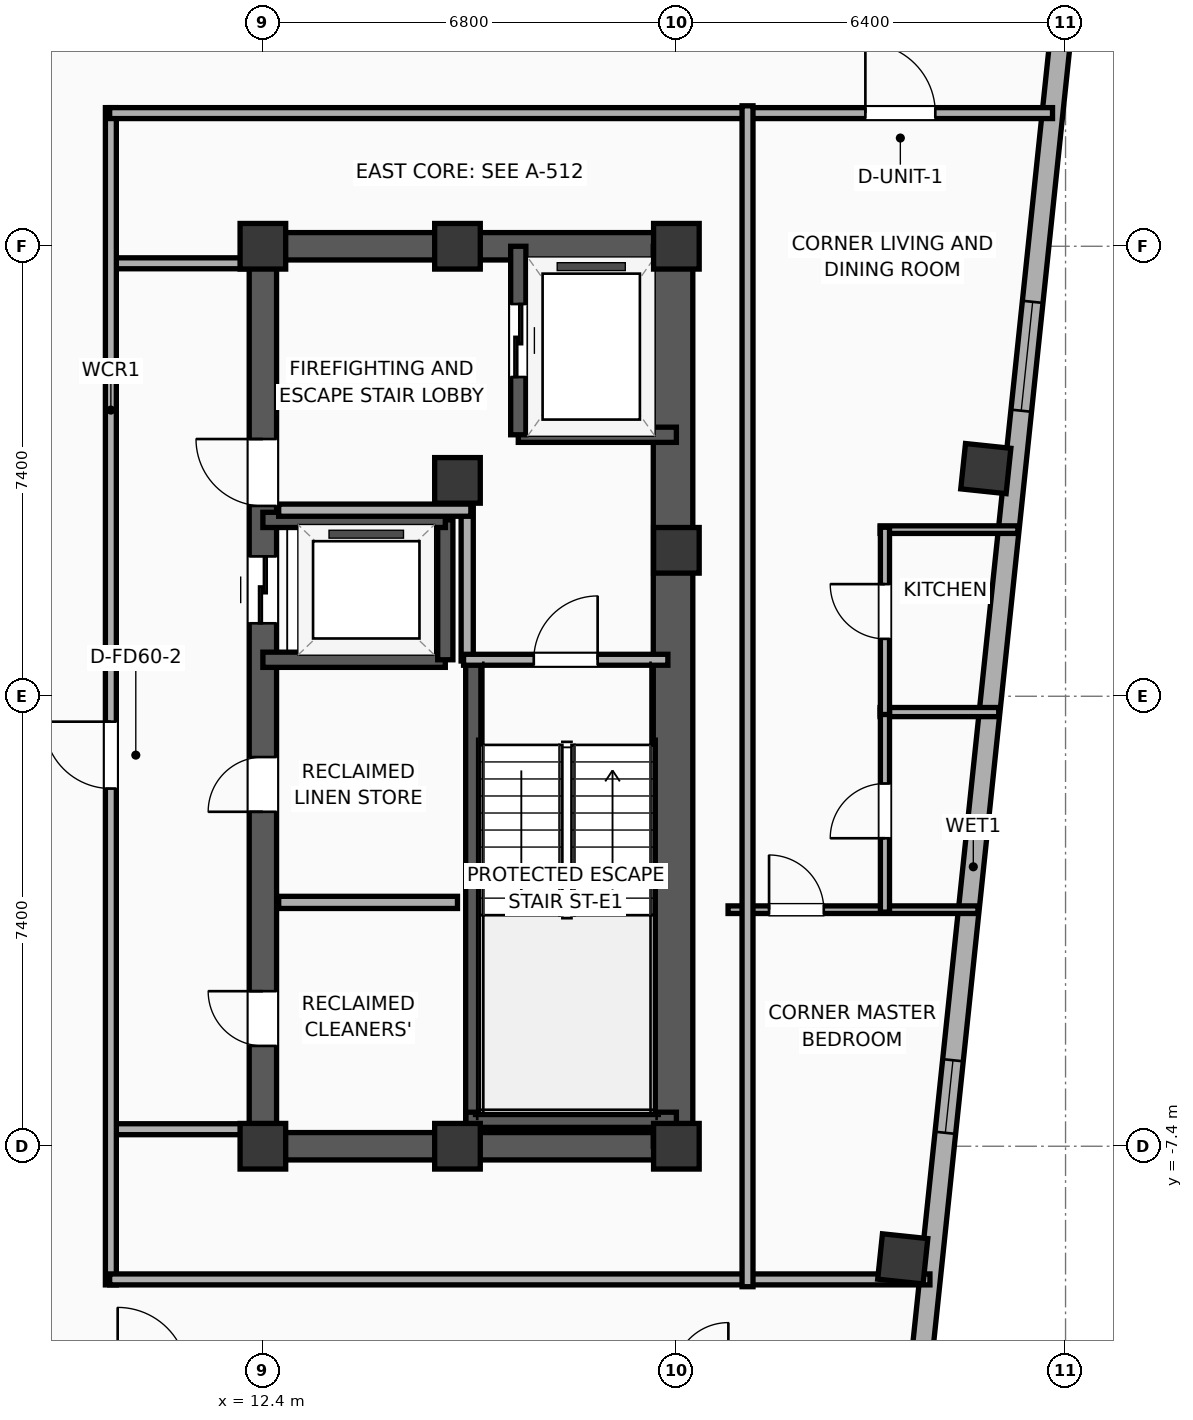
"""IFC4 building model, lengths in metres.
Left out: names, types, materials, properties, quantities, classifications, styles, units other than length and angle.
Written with IfcOpenShell. Run it as: python <this file> out.ifc"""

import sys

from ifc_helpers import new_model, si_unit, direction, frame, frame_2d, origin, origin_2d, place, context, subcontext, project, spatial, rectangle, hollow_rectangle, extrude, element, fill, save


model = new_model("IFC4")
c1 = context("Model", 3, precision=1e-05, world=origin(), true_north=direction((0.0, 1.0)))
c2 = subcontext(c1, "Body", "Model", "MODEL_VIEW")
j1 = project(units=[si_unit("LENGTHUNIT", "METRE"), si_unit("PLANEANGLEUNIT", "RADIAN")], contexts=[c1])
p1 = place(None, origin())
s1 = spatial("IfcSite", under=j1, at=p1, CompositionType="ELEMENT")
p2 = place(p1, origin())
s2 = spatial("IfcBuilding", under=s1, at=p2, CompositionType="ELEMENT")
p3 = place(p2, frame((0.0, 0.0, 287.3)))
s3 = spatial("IfcBuildingStorey", under=s2, at=p3, CompositionType="ELEMENT", Elevation=287.3)
for number, where, z_axis, x_axis in (
    (1, (12.4, -7.4, 0.0), (0.0, 0.0, 1.0), (1.0, 0.0, 0.0)),
    (2, (15.6, 3.55, 0.0), (0.0, 0.0, 1.0), (1.0, 0.0, 0.0)),
    (3, (12.4, 7.4, 0.0), (0.0, 0.0, 1.0), (1.0, 0.0, 0.0)),
    (4, (15.6, -7.4, 0.0), (0.0, 0.0, 1.0), (1.0, 0.0, 0.0)),
    (5, (15.6, 7.4, 0.0), (0.0, 0.0, 1.0), (1.0, 0.0, 0.0)),
    (6, (19.2, -7.4, 0.0), (0.0, 0.0, 1.0), (1.0, 0.0, 0.0)),
    (7, (19.2, 2.4, 0.0), (0.0, 0.0, 1.0), (1.0, 0.0, 0.0)),
    (8, (19.2, 7.4, 0.0), (0.0, 0.0, 1.0), (1.0, 0.0, 0.0)),
):
    element("IfcColumn", number, at=place(p3, frame(where, z_axis=z_axis, x_axis=x_axis)), inside=s3, PredefinedType="COLUMN", context=c2, shape_type="SweptSolid", body=[
        extrude(rectangle(XDim=0.75, YDim=0.75, at=origin_2d()), origin(), (0.0, 0.0, 1.0), 3.9),
    ])
for number, where, z_axis, x_axis in (
    (9, (12.175, -7.4, 0.0), (0.0, 0.0, 1.0), (1.0, 0.0, 0.0)),
    (10, (12.175, 7.4, 0.0), (0.0, 0.0, 1.0), (1.0, 0.0, 0.0)),
):
    element("IfcWall", number, at=place(p3, frame(where, z_axis=z_axis, x_axis=x_axis)), inside=s3, PredefinedType="SHEAR", context=c2, shape_type="SweptSolid", body=[
        extrude(rectangle(XDim=7.25, YDim=0.45, at=frame_2d((3.625, 0.0))), origin(), (0.0, 0.0, 1.0), 3.635),
    ])
p4 = place(p3, frame((12.4, -7.4, 0.0), z_axis=(0.0, 0.0, 1.0), x_axis=(0.0, 1.0, 0.0)))
e11 = element("IfcWall", 11, at=p4, inside=s3, PredefinedType="SHEAR", context=c2, shape_type="SweptSolid", body=[
    extrude(rectangle(XDim=14.8, YDim=0.45, at=frame_2d((7.4, 0.0))), origin(), (0.0, 0.0, 1.0), 3.635),
])
p5 = place(p4, frame((8.6, 0.0, 0.0)))
e12 = element("IfcOpeningElement", 12, at=p5, cuts=e11, PredefinedType="OPENING", context=c2, shape_type="SweptSolid", body=[
    extrude(rectangle(XDim=1.1, YDim=2.05, at=frame_2d((0.55, 1.025))), frame((0.0, 0.235, 0.0), z_axis=(0.0, -1.0, 0.0), x_axis=(1.0, 0.0, 0.0)), (0.0, 0.0, 1.0), 0.47),
])
p6 = place(p4, frame((10.53, 0.0, 0.0)))
e13 = element("IfcOpeningElement", 13, at=p6, cuts=e11, PredefinedType="OPENING", context=c2, shape_type="SweptSolid", body=[
    extrude(rectangle(XDim=1.1, YDim=2.05, at=frame_2d((0.55, 1.025))), frame((0.0, 0.235, 0.0), z_axis=(0.0, -1.0, 0.0), x_axis=(1.0, 0.0, 0.0)), (0.0, 0.0, 1.0), 0.47),
])
p7 = place(p4, frame((1.65, 0.0, 0.0)))
e14 = element("IfcOpeningElement", 14, at=p7, cuts=e11, PredefinedType="OPENING", context=c2, shape_type="SweptSolid", body=[
    extrude(rectangle(XDim=0.9, YDim=2.05, at=frame_2d((0.45, 1.025))), frame((0.0, 0.235, 0.0), z_axis=(0.0, -1.0, 0.0), x_axis=(1.0, 0.0, 0.0)), (0.0, 0.0, 1.0), 0.47),
])
p8 = place(p4, frame((5.5, 0.0, 0.0)))
e15 = element("IfcOpeningElement", 15, at=p8, cuts=e11, PredefinedType="OPENING", context=c2, shape_type="SweptSolid", body=[
    extrude(rectangle(XDim=0.9, YDim=2.05, at=frame_2d((0.45, 1.025))), frame((0.0, 0.235, 0.0), z_axis=(0.0, -1.0, 0.0), x_axis=(1.0, 0.0, 0.0)), (0.0, 0.0, 1.0), 0.47),
])
p9 = place(p3, frame((19.145, -7.4, 0.0), z_axis=(0.0, 0.0, 1.0), x_axis=(0.0, 1.0, 0.0)))
e16 = element("IfcWall", 16, at=p9, inside=s3, PredefinedType="SHEAR", context=c2, shape_type="SweptSolid", body=[
    extrude(rectangle(XDim=14.8, YDim=0.65, at=frame_2d((7.4, 0.0))), origin(), (0.0, 0.0, 1.0), 3.635),
])
p10 = place(p3, frame((15.86, -7.085, 0.0), z_axis=(0.0, 0.0, 1.0), x_axis=(0.0, 1.0, 0.0)))
e17 = element("IfcWall", 17, at=p10, inside=s3, PredefinedType="SOLIDWALL", context=c2, shape_type="SweptSolid", body=[
    extrude(rectangle(XDim=7.685, YDim=0.25, at=frame_2d((3.843, 0.0))), origin(), (0.0, 0.0, 1.0), 3.635),
])
p11 = place(p3, frame((15.74, -6.965, 0.0), z_axis=(0.0, 0.0, 1.0), x_axis=(1.0, 0.0, 0.0)))
e18 = element("IfcWall", 18, at=p11, inside=s3, PredefinedType="SOLIDWALL", context=c2, shape_type="SweptSolid", body=[
    extrude(rectangle(XDim=3.46, YDim=0.25, at=frame_2d((1.73, 0.0))), origin(), (0.0, 0.0, 1.0), 3.635),
])
for number, where, z_axis, x_axis in (
    (19, (22.923, -9.252, 0.0), (0.0, 0.0, 1.0), (0.995, -0.105, 0.0)),
    (20, (24.289, 3.744, 0.0), (0.0, 0.0, 1.0), (0.995, -0.105, 0.0)),
):
    element("IfcColumn", number, at=place(p3, frame(where, z_axis=z_axis, x_axis=x_axis)), inside=s3, PredefinedType="COLUMN", context=c2, shape_type="SweptSolid", body=[
        extrude(hollow_rectangle(XDim=0.75, YDim=0.75, WallThickness=0.025, at=origin_2d()), origin(), (0.0, 0.0, 1.0), 3.9),
    ])
p12 = place(p3, frame((25.67, 12.296, 0.0), z_axis=(0.0, 0.0, 1.0), x_axis=(-0.104533282919, -0.994521388791, 0.0)))
e21 = element("IfcWall", 21, at=p12, inside=s3, PredefinedType="ELEMENTEDWALL", context=c2, shape_type="SweptSolid", body=[
    extrude(rectangle(XDim=30.366, YDim=0.34, at=frame_2d((15.183, 0.0))), origin(), (0.0, 0.0, 1.0), 3.635),
])
p13 = place(p12, frame((5.842, 0.0, 0.75)))
e22 = element("IfcOpeningElement", 22, at=p13, cuts=e21, PredefinedType="OPENING", context=c2, shape_type="SweptSolid", body=[
    extrude(rectangle(XDim=1.8, YDim=2.1, at=frame_2d((0.9, 1.05))), frame((0.0, 0.18, 0.0), z_axis=(0.0, -1.0, 0.0), x_axis=(1.0, 0.0, 0.0)), (0.0, 0.0, 1.0), 0.36),
])
p14 = place(p12, frame((18.382, 0.0, 0.75)))
e23 = element("IfcOpeningElement", 23, at=p14, cuts=e21, PredefinedType="OPENING", context=c2, shape_type="SweptSolid", body=[
    extrude(rectangle(XDim=1.2, YDim=2.05, at=frame_2d((0.6, 1.025))), frame((0.0, 0.18, 0.0), z_axis=(0.0, -1.0, 0.0), x_axis=(1.0, 0.0, 0.0)), (0.0, 0.0, 1.0), 0.36),
])
p15 = place(p3, frame((16.6, 4.3, 0.0), z_axis=(0.0, 0.0, 1.0), x_axis=(1.0, 0.0, 0.0)))
e24 = element("IfcWall", 24, at=p15, inside=s3, PredefinedType="SOLIDWALL", context=c2, shape_type="SweptSolid", body=[
    extrude(rectangle(XDim=2.6, YDim=0.25, at=frame_2d((1.3, 0.0))), origin(), (0.0, 0.0, 1.0), 3.635),
])
p16 = place(p3, frame((16.6, 7.4, 0.0), z_axis=(0.0, 0.0, 1.0), x_axis=(0.0, -1.0, 0.0)))
e25 = element("IfcWall", 25, at=p16, inside=s3, PredefinedType="SOLIDWALL", context=c2, shape_type="SweptSolid", body=[
    extrude(rectangle(XDim=3.1, YDim=0.25, at=frame_2d((1.55, 0.0))), origin(), (0.0, 0.0, 1.0), 3.635),
])
p17 = place(p16, frame((0.95, 0.0, 0.0)))
e26 = element("IfcOpeningElement", 26, at=p17, cuts=e25, PredefinedType="OPENING", context=c2, shape_type="SweptSolid", body=[
    extrude(rectangle(XDim=1.2, YDim=2.05, at=frame_2d((0.6, 1.025))), frame((0.0, 0.135, 0.0), z_axis=(0.0, -1.0, 0.0), x_axis=(1.0, 0.0, 0.0)), (0.0, 0.0, 1.0), 0.27),
])
p18 = place(p3, frame((12.4, 0.6, 0.0), z_axis=(0.0, 0.0, 1.0), x_axis=(1.0, 0.0, 0.0)))
e27 = element("IfcWall", 27, at=p18, inside=s3, PredefinedType="SOLIDWALL", context=c2, shape_type="SweptSolid", body=[
    extrude(rectangle(XDim=3.0, YDim=0.25, at=frame_2d((1.5, 0.0))), origin(), (0.0, 0.0, 1.0), 3.635),
])
p19 = place(p3, frame((15.4, 0.6, 0.0), z_axis=(0.0, 0.0, 1.0), x_axis=(0.0, 1.0, 0.0)))
e28 = element("IfcWall", 28, at=p19, inside=s3, PredefinedType="SOLIDWALL", context=c2, shape_type="SweptSolid", body=[
    extrude(rectangle(XDim=2.3, YDim=0.25, at=frame_2d((1.15, 0.0))), origin(), (0.0, 0.0, 1.0), 3.635),
])
p20 = place(p3, frame((15.4, 2.9, 0.0), z_axis=(0.0, 0.0, 1.0), x_axis=(-1.0, 0.0, 0.0)))
e29 = element("IfcWall", 29, at=p20, inside=s3, PredefinedType="SOLIDWALL", context=c2, shape_type="SweptSolid", body=[
    extrude(rectangle(XDim=3.0, YDim=0.25, at=frame_2d((1.5, 0.0))), origin(), (0.0, 0.0, 1.0), 3.635),
])
p21 = place(p3, frame((15.76, 0.58, 0.0), z_axis=(0.0, 0.0, 1.0), x_axis=(0.0, 1.0, 0.0)))
e30 = element("IfcWall", 30, at=p21, inside=s3, PredefinedType="PARTITIONING", context=c2, shape_type="SweptSolid", body=[
    extrude(rectangle(XDim=2.52, YDim=0.2, at=frame_2d((1.26, 0.0))), origin(), (0.0, 0.0, 1.0), 3.635),
])
p22 = place(p3, frame((12.66, 3.06, 0.0), z_axis=(0.0, 0.0, 1.0), x_axis=(1.0, 0.0, 0.0)))
e31 = element("IfcWall", 31, at=p22, inside=s3, PredefinedType="PARTITIONING", context=c2, shape_type="SweptSolid", body=[
    extrude(rectangle(XDim=3.16, YDim=0.2, at=frame_2d((1.58, 0.0))), origin(), (0.0, 0.0, 1.0), 3.635),
])
p23 = place(p3, frame((15.7, 0.6, 0.0), z_axis=(0.0, 0.0, 1.0), x_axis=(1.0, 0.0, 0.0)))
e32 = element("IfcWall", 32, at=p23, inside=s3, PredefinedType="PARTITIONING", context=c2, shape_type="SweptSolid", body=[
    extrude(rectangle(XDim=3.36, YDim=0.18, at=frame_2d((1.68, 0.0))), origin(), (0.0, 0.0, 1.0), 3.635),
])
p24 = place(p23, frame((1.155, 0.0, 0.0)))
e33 = element("IfcOpeningElement", 33, at=p24, cuts=e32, PredefinedType="OPENING", context=c2, shape_type="SweptSolid", body=[
    extrude(rectangle(XDim=1.05, YDim=2.05, at=frame_2d((0.525, 1.025))), frame((0.0, 0.1, 0.0), z_axis=(0.0, -1.0, 0.0), x_axis=(1.0, 0.0, 0.0)), (0.0, 0.0, 1.0), 0.2),
])
p25 = place(p3, frame((12.66, -3.39, 0.0), z_axis=(0.0, 0.0, 1.0), x_axis=(1.0, 0.0, 0.0)))
e34 = element("IfcWall", 34, at=p25, inside=s3, PredefinedType="PARTITIONING", context=c2, shape_type="SweptSolid", body=[
    extrude(rectangle(XDim=2.94, YDim=0.2, at=frame_2d((1.47, 0.0))), origin(), (0.0, 0.0, 1.0), 3.635),
])
for number, where, z_axis, x_axis in (
    (35, (9.88, 7.12, 0.0), (0.0, 0.0, 1.0), (1.0, 0.0, 0.0)),
    (36, (9.88, -7.12, 0.0), (0.0, 0.0, 1.0), (1.0, 0.0, 0.0)),
):
    element("IfcWall", number, at=place(p3, frame(where, z_axis=z_axis, x_axis=x_axis)), inside=s3, PredefinedType="PARTITIONING", context=c2, shape_type="SweptSolid", body=[
        extrude(rectangle(XDim=2.27, YDim=0.18, at=frame_2d((1.135, 0.0))), origin(), (0.0, 0.0, 1.0), 3.635),
    ])
p26 = place(p3, frame((9.9, -9.68, 0.0), z_axis=(0.0, 0.0, 1.0), x_axis=(0.0, 1.0, 0.0)))
e37 = element("IfcWall", 37, at=p26, inside=s3, PredefinedType="PARTITIONING", context=c2, shape_type="SweptSolid", body=[
    extrude(rectangle(XDim=19.36, YDim=0.18, at=frame_2d((9.68, 0.0))), origin(), (0.0, 0.0, 1.0), 3.635),
])
p27 = place(p26, frame((8.162, 0.0, 0.0)))
e38 = element("IfcOpeningElement", 38, at=p27, cuts=e37, PredefinedType="OPENING", context=c2, shape_type="SweptSolid", body=[
    extrude(rectangle(XDim=1.1, YDim=2.05, at=frame_2d((0.55, 1.025))), frame((0.0, 0.1, 0.0), z_axis=(0.0, -1.0, 0.0), x_axis=(1.0, 0.0, 0.0)), (0.0, 0.0, 1.0), 0.2),
])
p28 = place(p3, frame((9.88, 9.59, 0.0), z_axis=(0.0, 0.0, 1.0), x_axis=(1.0, 0.0, 0.0)))
e39 = element("IfcWall", 39, at=p28, inside=s3, PredefinedType="PARTITIONING", context=c2, shape_type="SweptSolid", body=[
    extrude(rectangle(XDim=15.506, YDim=0.18, at=frame_2d((7.753, 0.0))), origin(), (0.0, 0.0, 1.0), 3.635),
])
p29 = place(p28, frame((12.428, 0.0, 0.0)))
e40 = element("IfcOpeningElement", 40, at=p29, cuts=e39, PredefinedType="OPENING", context=c2, shape_type="SweptSolid", body=[
    extrude(rectangle(XDim=1.15, YDim=2.05, at=frame_2d((0.575, 1.025))), frame((0.0, 0.1, 0.0), z_axis=(0.0, -1.0, 0.0), x_axis=(1.0, 0.0, 0.0)), (0.0, 0.0, 1.0), 0.2),
])
p30 = place(p3, frame((9.88, -9.59, 0.0), z_axis=(0.0, 0.0, 1.0), x_axis=(1.0, 0.0, 0.0)))
e41 = element("IfcWall", 41, at=p30, inside=s3, PredefinedType="PARTITIONING", context=c2, shape_type="SweptSolid", body=[
    extrude(rectangle(XDim=13.49, YDim=0.18, at=frame_2d((6.745, 0.0))), origin(), (0.0, 0.0, 1.0), 3.635),
])
p31 = place(p3, frame((22.55, 2.74, 0.0), z_axis=(0.0, 0.0, 1.0), x_axis=(1.0, 0.0, 0.0)))
e42 = element("IfcWall", 42, at=p31, inside=s3, PredefinedType="PARTITIONING", context=c2, shape_type="SweptSolid", body=[
    extrude(rectangle(XDim=2.267, YDim=0.125, at=frame_2d((1.133, 0.0))), origin(), (0.0, 0.0, 1.0), 3.635),
])
p32 = place(p3, frame((22.55, -0.26, 0.0), z_axis=(0.0, 0.0, 1.0), x_axis=(1.0, 0.0, 0.0)))
e43 = element("IfcWall", 43, at=p32, inside=s3, PredefinedType="PLUMBINGWALL", context=c2, shape_type="SweptSolid", body=[
    extrude(rectangle(XDim=1.951, YDim=0.15, at=frame_2d((0.976, 0.0))), origin(), (0.0, 0.0, 1.0), 3.635),
])
p33 = place(p3, frame((20.05, -3.51, 0.0), z_axis=(0.0, 0.0, 1.0), x_axis=(1.0, 0.0, 0.0)))
e44 = element("IfcWall", 44, at=p33, inside=s3, PredefinedType="PARTITIONING", context=c2, shape_type="SweptSolid", body=[
    extrude(rectangle(XDim=4.11, YDim=0.125, at=frame_2d((2.055, 0.0))), origin(), (0.0, 0.0, 1.0), 3.635),
])
p34 = place(p33, frame((0.674, 0.0, 0.0)))
e45 = element("IfcOpeningElement", 45, at=p34, cuts=e44, PredefinedType="OPENING", context=c2, shape_type="SweptSolid", body=[
    extrude(rectangle(XDim=0.9, YDim=2.05, at=frame_2d((0.45, 1.025))), frame((0.0, 0.073, 0.0), z_axis=(0.0, -1.0, 0.0), x_axis=(1.0, 0.0, 0.0)), (0.0, 0.0, 1.0), 0.145),
])
p35 = place(p3, frame((22.63, -3.55, 0.0), z_axis=(0.0, 0.0, 1.0), x_axis=(0.0, 1.0, 0.0)))
e46 = element("IfcWall", 46, at=p35, inside=s3, PredefinedType="PLUMBINGWALL", context=c2, shape_type="SweptSolid", body=[
    extrude(rectangle(XDim=3.33, YDim=0.15, at=frame_2d((1.665, 0.0))), origin(), (0.0, 0.0, 1.0), 3.635),
])
p36 = place(p35, frame((1.215, 0.0, 0.0)))
e47 = element("IfcOpeningElement", 47, at=p36, cuts=e46, PredefinedType="OPENING", context=c2, shape_type="SweptSolid", body=[
    extrude(rectangle(XDim=0.9, YDim=2.05, at=frame_2d((0.45, 1.025))), frame((0.0, 0.085, 0.0), z_axis=(0.0, -1.0, 0.0), x_axis=(1.0, 0.0, 0.0)), (0.0, 0.0, 1.0), 0.17),
])
p37 = place(p3, frame((22.63, -0.3, 0.0), z_axis=(0.0, 0.0, 1.0), x_axis=(0.0, 1.0, 0.0)))
e48 = element("IfcWall", 48, at=p37, inside=s3, PredefinedType="PLUMBINGWALL", context=c2, shape_type="SweptSolid", body=[
    extrude(rectangle(XDim=3.08, YDim=0.15, at=frame_2d((1.54, 0.0))), origin(), (0.0, 0.0, 1.0), 3.635),
])
p38 = place(p37, frame((1.244, 0.0, 0.0)))
e49 = element("IfcOpeningElement", 49, at=p38, cuts=e48, PredefinedType="OPENING", context=c2, shape_type="SweptSolid", body=[
    extrude(rectangle(XDim=0.9, YDim=2.05, at=frame_2d((0.45, 1.025))), frame((0.0, 0.085, 0.0), z_axis=(0.0, -1.0, 0.0), x_axis=(1.0, 0.0, 0.0)), (0.0, 0.0, 1.0), 0.17),
])
p39 = place(p3, frame((20.37, -9.71, 0.0), z_axis=(0.0, 0.0, 1.0), x_axis=(0.0, 1.0, 0.0)))
e50 = element("IfcWall", 50, at=p39, inside=s3, PredefinedType="PARTITIONING", context=c2, shape_type="SweptSolid", body=[
    extrude(rectangle(XDim=19.42, YDim=0.18, at=frame_2d((9.71, 0.0))), origin(), (0.0, 0.0, 1.0), 3.635),
])
p40 = place(p13, origin())
e51 = element("IfcWindow", 51, at=p40, inside=s3, PartitioningType="SINGLE_PANEL", PredefinedType="WINDOW", context=c2, shape_type="SweptSolid", body=[
    extrude(rectangle(XDim=1.8, YDim=2.1, at=frame_2d((0.9, 1.05))), frame((0.0, 0.03, 0.0), z_axis=(0.0, -1.0, 0.0), x_axis=(1.0, 0.0, 0.0)), (0.0, 0.0, 1.0), 0.06),
])
fill(e22, e51)
p41 = place(p14, origin())
e52 = element("IfcWindow", 52, at=p41, inside=s3, PartitioningType="SINGLE_PANEL", PredefinedType="WINDOW", context=c2, shape_type="SweptSolid", body=[
    extrude(rectangle(XDim=1.2, YDim=2.05, at=frame_2d((0.6, 1.025))), frame((0.0, 0.03, 0.0), z_axis=(0.0, -1.0, 0.0), x_axis=(1.0, 0.0, 0.0)), (0.0, 0.0, 1.0), 0.06),
])
fill(e23, e52)
p42 = place(p17, origin())
e53 = element("IfcDoor", 53, at=p42, inside=s3, OperationType="SLIDING_TO_LEFT", PredefinedType="DOOR", context=c2, shape_type="SweptSolid", body=[
    extrude(rectangle(XDim=1.2, YDim=2.05, at=frame_2d((0.6, 1.025))), frame((0.0, 0.025, 0.0), z_axis=(0.0, -1.0, 0.0), x_axis=(1.0, 0.0, 0.0)), (0.0, 0.0, 1.0), 0.05),
])
fill(e26, e53)
p43 = place(p5, origin())
e54 = element("IfcDoor", 54, at=p43, inside=s3, OperationType="SLIDING_TO_LEFT", PredefinedType="DOOR", context=c2, shape_type="SweptSolid", body=[
    extrude(rectangle(XDim=1.1, YDim=2.05, at=frame_2d((0.55, 1.025))), frame((0.0, 0.025, 0.0), z_axis=(0.0, -1.0, 0.0), x_axis=(1.0, 0.0, 0.0)), (0.0, 0.0, 1.0), 0.05),
])
fill(e12, e54)
p44 = place(p24, origin())
e55 = element("IfcDoor", 55, at=p44, inside=s3, OperationType="SINGLE_SWING_RIGHT", PredefinedType="DOOR", context=c2, shape_type="SweptSolid", body=[
    extrude(rectangle(XDim=1.05, YDim=2.05, at=frame_2d((0.525, 1.025))), frame((0.0, 0.025, 0.0), z_axis=(0.0, -1.0, 0.0), x_axis=(1.0, 0.0, 0.0)), (0.0, 0.0, 1.0), 0.05),
])
fill(e33, e55)
p45 = place(p27, origin())
e56 = element("IfcDoor", 56, at=p45, inside=s3, OperationType="SINGLE_SWING_RIGHT", PredefinedType="DOOR", context=c2, shape_type="SweptSolid", body=[
    extrude(rectangle(XDim=1.1, YDim=2.05, at=frame_2d((0.55, 1.025))), frame((0.0, 0.025, 0.0), z_axis=(0.0, -1.0, 0.0), x_axis=(1.0, 0.0, 0.0)), (0.0, 0.0, 1.0), 0.05),
])
fill(e38, e56)
p46 = place(p29, origin())
e57 = element("IfcDoor", 57, at=p46, inside=s3, OperationType="SINGLE_SWING_LEFT", PredefinedType="DOOR", context=c2, shape_type="SweptSolid", body=[
    extrude(rectangle(XDim=1.15, YDim=2.05, at=frame_2d((0.575, 1.025))), frame((0.0, 0.025, 0.0), z_axis=(0.0, -1.0, 0.0), x_axis=(1.0, 0.0, 0.0)), (0.0, 0.0, 1.0), 0.05),
])
fill(e40, e57)
p47 = place(p34, origin())
e58 = element("IfcDoor", 58, at=p47, inside=s3, OperationType="SINGLE_SWING_LEFT", PredefinedType="DOOR", context=c2, shape_type="SweptSolid", body=[
    extrude(rectangle(XDim=0.9, YDim=2.05, at=frame_2d((0.45, 1.025))), frame((0.0, 0.025, 0.0), z_axis=(0.0, -1.0, 0.0), x_axis=(1.0, 0.0, 0.0)), (0.0, 0.0, 1.0), 0.05),
])
fill(e45, e58)
p48 = place(p36, origin())
e59 = element("IfcDoor", 59, at=p48, inside=s3, OperationType="SINGLE_SWING_LEFT", PredefinedType="DOOR", context=c2, shape_type="SweptSolid", body=[
    extrude(rectangle(XDim=0.9, YDim=2.05, at=frame_2d((0.45, 1.025))), frame((0.0, 0.025, 0.0), z_axis=(0.0, -1.0, 0.0), x_axis=(1.0, 0.0, 0.0)), (0.0, 0.0, 1.0), 0.05),
])
fill(e47, e59)
p49 = place(p38, origin())
e60 = element("IfcDoor", 60, at=p49, inside=s3, OperationType="SINGLE_SWING_RIGHT", PredefinedType="DOOR", context=c2, shape_type="SweptSolid", body=[
    extrude(rectangle(XDim=0.9, YDim=2.05, at=frame_2d((0.45, 1.025))), frame((0.0, 0.025, 0.0), z_axis=(0.0, -1.0, 0.0), x_axis=(1.0, 0.0, 0.0)), (0.0, 0.0, 1.0), 0.05),
])
fill(e49, e60)
p50 = place(p6, origin())
e61 = element("IfcDoor", 61, at=p50, inside=s3, OperationType="SINGLE_SWING_RIGHT", PredefinedType="DOOR", context=c2, shape_type="SweptSolid", body=[
    extrude(rectangle(XDim=1.1, YDim=2.05, at=frame_2d((0.55, 1.025))), frame((0.0, 0.025, 0.0), z_axis=(0.0, -1.0, 0.0), x_axis=(1.0, 0.0, 0.0)), (0.0, 0.0, 1.0), 0.05),
])
fill(e13, e61)
p51 = place(p7, origin())
e62 = element("IfcDoor", 62, at=p51, inside=s3, OperationType="SINGLE_SWING_RIGHT", PredefinedType="DOOR", context=c2, shape_type="SweptSolid", body=[
    extrude(rectangle(XDim=0.9, YDim=2.05, at=frame_2d((0.45, 1.025))), frame((0.0, 0.025, 0.0), z_axis=(0.0, -1.0, 0.0), x_axis=(1.0, 0.0, 0.0)), (0.0, 0.0, 1.0), 0.05),
])
fill(e14, e62)
p52 = place(p8, origin())
e63 = element("IfcDoor", 63, at=p52, inside=s3, OperationType="SINGLE_SWING_LEFT", PredefinedType="DOOR", context=c2, shape_type="SweptSolid", body=[
    extrude(rectangle(XDim=0.9, YDim=2.05, at=frame_2d((0.45, 1.025))), frame((0.0, 0.025, 0.0), z_axis=(0.0, -1.0, 0.0), x_axis=(1.0, 0.0, 0.0)), (0.0, 0.0, 1.0), 0.05),
])
fill(e15, e63)
save(model, sys.argv[1])
